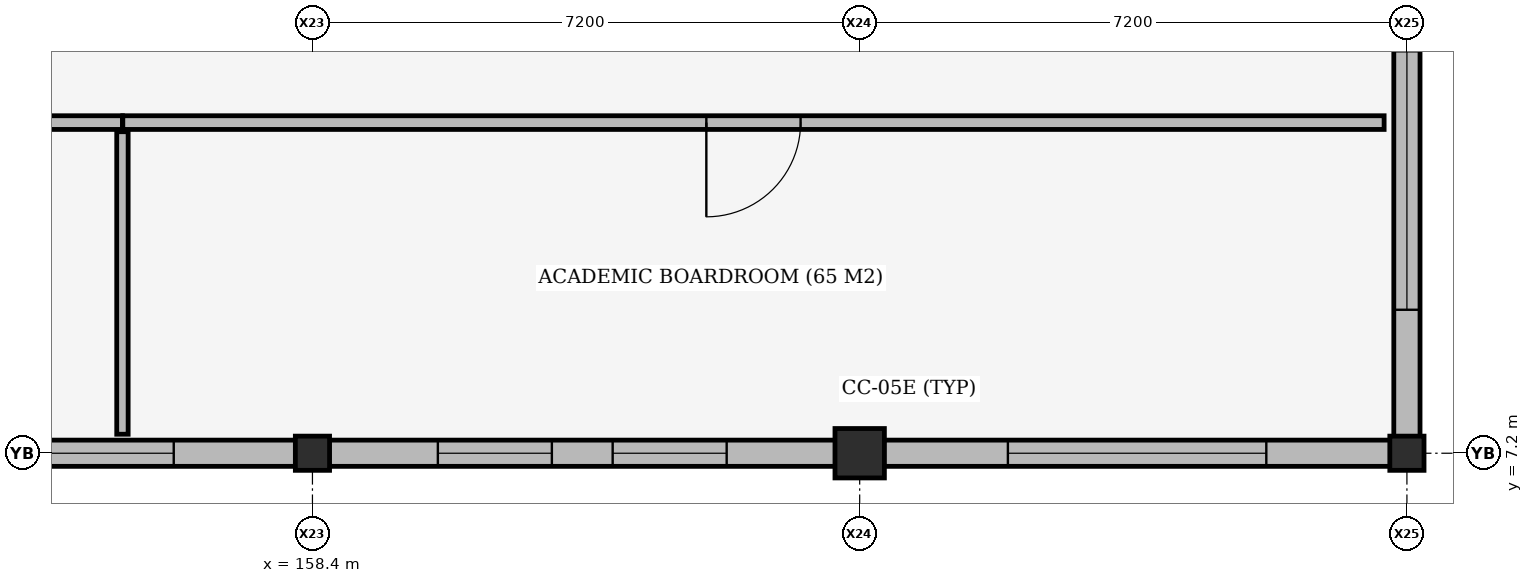
"""IFC4 building model, lengths in metres.
Left out: names, types, materials, properties, quantities, classifications, styles, units other than length and angle.
Written with IfcOpenShell. Run it as: python <this file> out.ifc"""

import sys

from ifc_helpers import new_model, si_unit, direction, frame, frame_2d, origin, origin_2d, place, context, subcontext, project, spatial, rectangle, extrude, element, fill, save


model = new_model("IFC4")
c1 = context("Model", 3, precision=1e-05, world=origin(), true_north=direction((0.0, 1.0)))
c2 = subcontext(c1, "Body", "Model", "MODEL_VIEW")
j1 = project(units=[si_unit("LENGTHUNIT", "METRE"), si_unit("PLANEANGLEUNIT", "RADIAN")], contexts=[c1])
p1 = place(None, origin())
s1 = spatial("IfcSite", under=j1, at=p1, CompositionType="ELEMENT")
p2 = place(p1, origin())
s2 = spatial("IfcBuilding", under=s1, at=p2, CompositionType="ELEMENT")
p3 = place(p2, frame((0.0, 0.0, 5.4)))
s3 = spatial("IfcBuildingStorey", under=s2, at=p3, CompositionType="ELEMENT", Elevation=5.4)
p4 = place(p3, frame((158.4, 7.2, 0.0), z_axis=(0.0, 0.0, 1.0), x_axis=(1.0, 0.0, 0.0)))
e1 = element("IfcColumn", 1, at=p4, inside=s3, PredefinedType="COLUMN", context=c2, shape_type="SweptSolid", body=[
    extrude(rectangle(XDim=0.45, YDim=0.45, at=origin_2d()), origin(), (0.0, 0.0, 1.0), 3.85),
])
p5 = place(p3, frame((165.6, 7.2, 0.0), z_axis=(0.0, 0.0, 1.0), x_axis=(1.0, 0.0, 0.0)))
e2 = element("IfcColumn", 2, at=p5, inside=s3, PredefinedType="COLUMN", context=c2, shape_type="SweptSolid", body=[
    extrude(rectangle(XDim=0.65, YDim=0.65, at=origin_2d()), origin(), (0.0, 0.0, 1.0), 3.85),
])
p6 = place(p3, frame((172.8, 7.2, 0.0), z_axis=(0.0, 0.0, 1.0), x_axis=(1.0, 0.0, 0.0)))
e3 = element("IfcColumn", 3, at=p6, inside=s3, PredefinedType="COLUMN", context=c2, shape_type="SweptSolid", body=[
    extrude(rectangle(XDim=0.45, YDim=0.45, at=origin_2d()), origin(), (0.0, 0.0, 1.0), 3.85),
])
p7 = place(p3, frame((158.183, 7.2, 0.0), z_axis=(0.0, 0.0, 1.0), x_axis=(-1.0, 0.0, 0.0)))
e4 = element("IfcWall", 4, at=p7, inside=s3, PredefinedType="STANDARD", context=c2, shape_type="SweptSolid", body=[
    extrude(rectangle(XDim=6.616, YDim=0.345, at=frame_2d((3.308, 0.0))), origin(), (0.0, 0.0, 1.0), 3.11),
])
p8 = place(p7, frame((1.608, 0.0, 0.9)))
e5 = element("IfcOpeningElement", 5, at=p8, cuts=e4, PredefinedType="OPENING", context=c2, shape_type="SweptSolid", body=[
    extrude(rectangle(XDim=3.4, YDim=1.5, at=frame_2d((1.7, 0.75))), frame((0.0, 0.182, 0.0), z_axis=(0.0, -1.0, 0.0), x_axis=(1.0, 0.0, 0.0)), (0.0, 0.0, 1.0), 0.365),
])
p9 = place(p3, frame((165.283, 7.2, 0.0), z_axis=(0.0, 0.0, 1.0), x_axis=(-1.0, 0.0, 0.0)))
e6 = element("IfcWall", 6, at=p9, inside=s3, PredefinedType="STANDARD", context=c2, shape_type="SweptSolid", body=[
    extrude(rectangle(XDim=6.666, YDim=0.345, at=frame_2d((3.333, 0.0))), origin(), (0.0, 0.0, 1.0), 3.33),
])
p10 = place(p9, frame((1.433, 0.0, 0.95)))
e7 = element("IfcOpeningElement", 7, at=p10, cuts=e6, PredefinedType="OPENING", context=c2, shape_type="SweptSolid", body=[
    extrude(rectangle(XDim=1.5, YDim=2.1, at=frame_2d((0.75, 1.05))), frame((0.0, 0.182, 0.0), z_axis=(0.0, -1.0, 0.0), x_axis=(1.0, 0.0, 0.0)), (0.0, 0.0, 1.0), 0.365),
])
p11 = place(p9, frame((3.733, 0.0, 0.95)))
e8 = element("IfcOpeningElement", 8, at=p11, cuts=e6, PredefinedType="OPENING", context=c2, shape_type="SweptSolid", body=[
    extrude(rectangle(XDim=1.5, YDim=2.1, at=frame_2d((0.75, 1.05))), frame((0.0, 0.182, 0.0), z_axis=(0.0, -1.0, 0.0), x_axis=(1.0, 0.0, 0.0)), (0.0, 0.0, 1.0), 0.365),
])
p12 = place(p3, frame((172.583, 7.2, 0.0), z_axis=(0.0, 0.0, 1.0), x_axis=(-1.0, 0.0, 0.0)))
e9 = element("IfcWall", 9, at=p12, inside=s3, PredefinedType="STANDARD", context=c2, shape_type="SweptSolid", body=[
    extrude(rectangle(XDim=6.666, YDim=0.345, at=frame_2d((3.333, 0.0))), origin(), (0.0, 0.0, 1.0), 3.27),
])
p13 = place(p12, frame((1.633, 0.0, 0.9)))
e10 = element("IfcOpeningElement", 10, at=p13, cuts=e9, PredefinedType="OPENING", context=c2, shape_type="SweptSolid", body=[
    extrude(rectangle(XDim=3.4, YDim=1.5, at=frame_2d((1.7, 0.75))), frame((0.0, 0.182, 0.0), z_axis=(0.0, -1.0, 0.0), x_axis=(1.0, 0.0, 0.0)), (0.0, 0.0, 1.0), 0.365),
])
p14 = place(p3, frame((172.8, 14.158, 0.0), z_axis=(0.0, 0.0, 1.0), x_axis=(0.0, -1.0, 0.0)))
e11 = element("IfcWall", 11, at=p14, inside=s3, PredefinedType="STANDARD", context=c2, shape_type="SweptSolid", body=[
    extrude(rectangle(XDim=6.741, YDim=0.345, at=frame_2d((3.371, 0.0))), origin(), (0.0, 0.0, 1.0), 3.21),
])
p15 = place(p14, frame((1.67, 0.0, 0.9)))
e12 = element("IfcOpeningElement", 12, at=p15, cuts=e11, PredefinedType="OPENING", context=c2, shape_type="SweptSolid", body=[
    extrude(rectangle(XDim=3.4, YDim=1.5, at=frame_2d((1.7, 0.75))), frame((0.0, 0.182, 0.0), z_axis=(0.0, -1.0, 0.0), x_axis=(1.0, 0.0, 0.0)), (0.0, 0.0, 1.0), 0.365),
])
p16 = place(p3, frame((147.605, 11.55, 0.0), z_axis=(0.0, 0.0, 1.0), x_axis=(1.0, 0.0, 0.0)))
e13 = element("IfcWall", 13, at=p16, inside=s3, PredefinedType="PARTITIONING", context=c2, shape_type="SweptSolid", body=[
    extrude(rectangle(XDim=8.295, YDim=0.18, at=frame_2d((4.147, 0.0))), origin(), (0.0, 0.0, 1.0), 3.11),
])
p17 = place(p16, frame((3.538, 0.0, 0.0)))
e14 = element("IfcOpeningElement", 14, at=p17, cuts=e13, PredefinedType="OPENING", context=c2, shape_type="SweptSolid", body=[
    extrude(rectangle(XDim=1.22, YDim=2.25, at=frame_2d((0.61, 1.125))), frame((0.0, 0.1, 0.0), z_axis=(0.0, -1.0, 0.0), x_axis=(1.0, 0.0, 0.0)), (0.0, 0.0, 1.0), 0.2),
])
p18 = place(p3, frame((155.9, 7.45, 0.0), z_axis=(0.0, 0.0, 1.0), x_axis=(0.0, 1.0, 0.0)))
e15 = element("IfcWall", 15, at=p18, inside=s3, PredefinedType="PARTITIONING", context=c2, shape_type="SweptSolid", body=[
    extrude(rectangle(XDim=3.98, YDim=0.15, at=frame_2d((1.99, 0.0))), origin(), (0.0, 0.0, 1.0), 3.61),
])
p19 = place(p3, frame((155.905, 11.55, 0.0), z_axis=(0.0, 0.0, 1.0), x_axis=(1.0, 0.0, 0.0)))
e16 = element("IfcWall", 16, at=p19, inside=s3, PredefinedType="PARTITIONING", context=c2, shape_type="SweptSolid", body=[
    extrude(rectangle(XDim=16.595, YDim=0.18, at=frame_2d((8.297, 0.0))), origin(), (0.0, 0.0, 1.0), 3.21),
])
p20 = place(p19, frame((7.677, 0.0, 0.0)))
e17 = element("IfcOpeningElement", 17, at=p20, cuts=e16, PredefinedType="OPENING", context=c2, shape_type="SweptSolid", body=[
    extrude(rectangle(XDim=1.24, YDim=2.25, at=frame_2d((0.62, 1.125))), frame((0.0, 0.1, 0.0), z_axis=(0.0, -1.0, 0.0), x_axis=(1.0, 0.0, 0.0)), (0.0, 0.0, 1.0), 0.2),
])
p21 = place(p8, origin())
e18 = element("IfcWindow", 18, at=p21, inside=s3, PartitioningType="DOUBLE_PANEL_VERTICAL", PredefinedType="WINDOW", context=c2, shape_type="SweptSolid", body=[
    extrude(rectangle(XDim=3.4, YDim=1.5, at=frame_2d((1.7, 0.75))), frame((0.0, 0.03, 0.0), z_axis=(0.0, -1.0, 0.0), x_axis=(1.0, 0.0, 0.0)), (0.0, 0.0, 1.0), 0.06),
])
fill(e5, e18)
p22 = place(p10, origin())
e19 = element("IfcWindow", 19, at=p22, inside=s3, PartitioningType="DOUBLE_PANEL_VERTICAL", PredefinedType="WINDOW", context=c2, shape_type="SweptSolid", body=[
    extrude(rectangle(XDim=1.5, YDim=2.1, at=frame_2d((0.75, 1.05))), frame((0.0, 0.03, 0.0), z_axis=(0.0, -1.0, 0.0), x_axis=(1.0, 0.0, 0.0)), (0.0, 0.0, 1.0), 0.06),
])
fill(e7, e19)
p23 = place(p11, origin())
e20 = element("IfcWindow", 20, at=p23, inside=s3, PartitioningType="DOUBLE_PANEL_VERTICAL", PredefinedType="WINDOW", context=c2, shape_type="SweptSolid", body=[
    extrude(rectangle(XDim=1.5, YDim=2.1, at=frame_2d((0.75, 1.05))), frame((0.0, 0.03, 0.0), z_axis=(0.0, -1.0, 0.0), x_axis=(1.0, 0.0, 0.0)), (0.0, 0.0, 1.0), 0.06),
])
fill(e8, e20)
p24 = place(p13, origin())
e21 = element("IfcWindow", 21, at=p24, inside=s3, PartitioningType="DOUBLE_PANEL_VERTICAL", PredefinedType="WINDOW", context=c2, shape_type="SweptSolid", body=[
    extrude(rectangle(XDim=3.4, YDim=1.5, at=frame_2d((1.7, 0.75))), frame((0.0, 0.03, 0.0), z_axis=(0.0, -1.0, 0.0), x_axis=(1.0, 0.0, 0.0)), (0.0, 0.0, 1.0), 0.06),
])
fill(e10, e21)
p25 = place(p15, origin())
e22 = element("IfcWindow", 22, at=p25, inside=s3, PartitioningType="DOUBLE_PANEL_VERTICAL", PredefinedType="WINDOW", context=c2, shape_type="SweptSolid", body=[
    extrude(rectangle(XDim=3.4, YDim=1.5, at=frame_2d((1.7, 0.75))), frame((0.0, 0.03, 0.0), z_axis=(0.0, -1.0, 0.0), x_axis=(1.0, 0.0, 0.0)), (0.0, 0.0, 1.0), 0.06),
])
fill(e12, e22)
p26 = place(p20, origin())
e23 = element("IfcDoor", 23, at=p26, inside=s3, OperationType="SINGLE_SWING_RIGHT", PredefinedType="DOOR", context=c2, shape_type="SweptSolid", body=[
    extrude(rectangle(XDim=1.24, YDim=2.25, at=frame_2d((0.62, 1.125))), frame((0.0, 0.025, 0.0), z_axis=(0.0, -1.0, 0.0), x_axis=(1.0, 0.0, 0.0)), (0.0, 0.0, 1.0), 0.05),
])
fill(e17, e23)
save(model, sys.argv[1])
